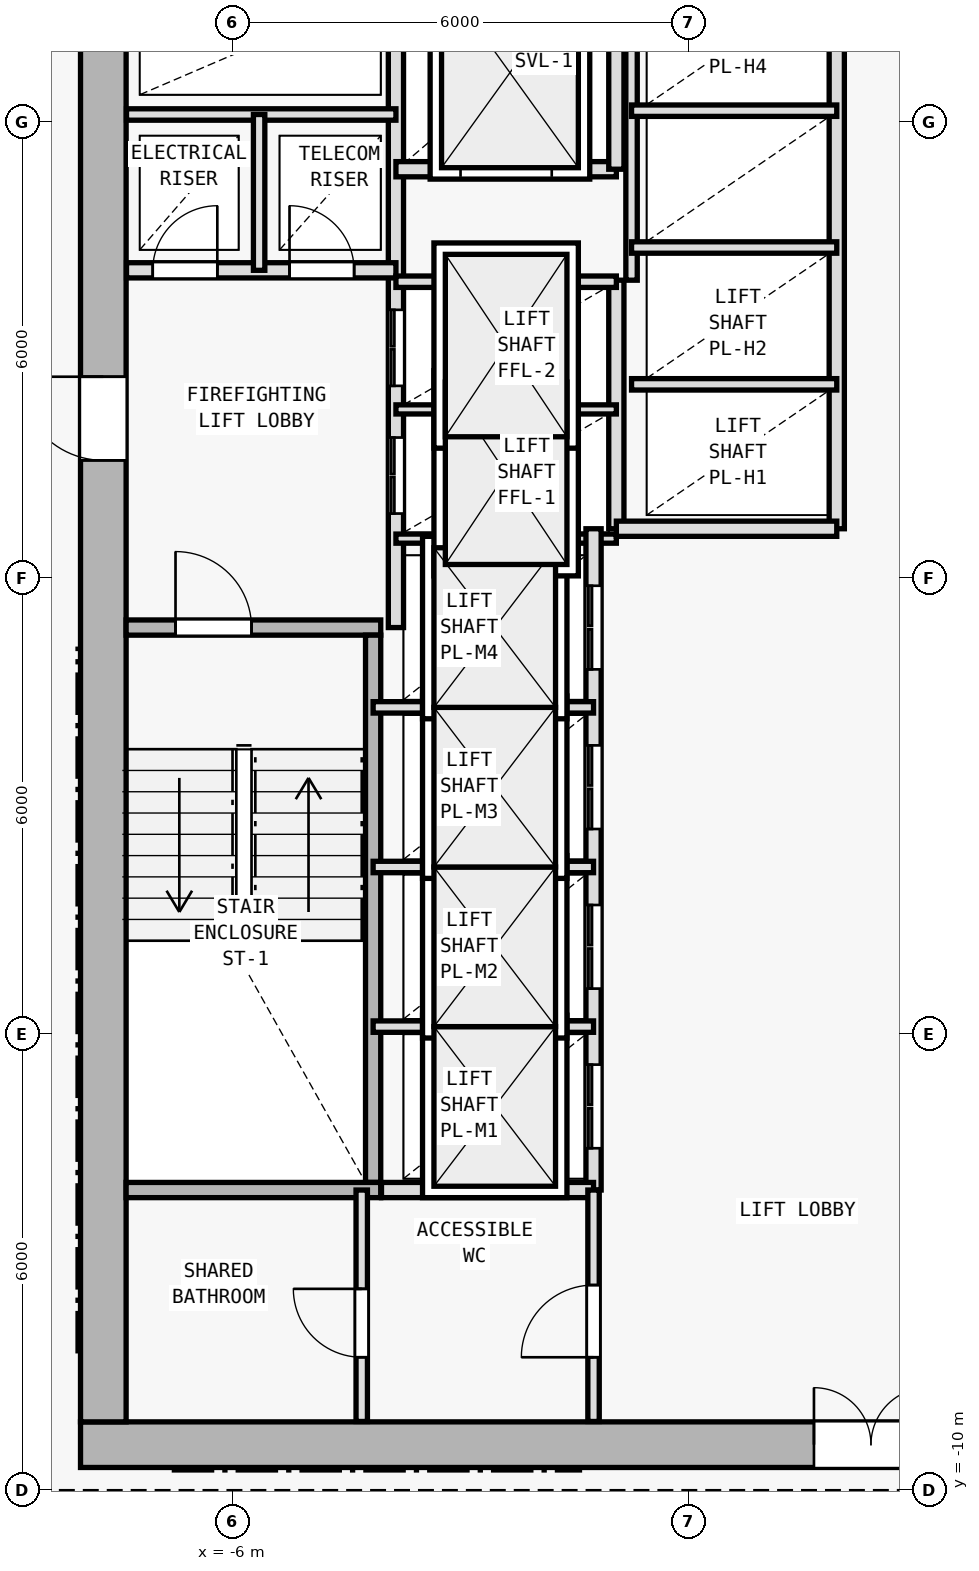
"""IFC4 building model, lengths in metres.
Left out: names, types, materials, properties, quantities, classifications, styles, units other than length and angle.
Written with IfcOpenShell. Run it as: python <this file> out.ifc"""

import sys

from ifc_helpers import new_model, si_unit, direction, frame, frame_2d, origin, origin_2d, place, context, subcontext, project, spatial, rectangle, i_section, extrude, element, fill, save


model = new_model("IFC4")
c1 = context("Model", 3, precision=1e-05, world=origin(), true_north=direction((0.0, 1.0)))
c2 = subcontext(c1, "Body", "Model", "MODEL_VIEW")
j1 = project(units=[si_unit("LENGTHUNIT", "METRE"), si_unit("PLANEANGLEUNIT", "RADIAN")], contexts=[c1])
p1 = place(None, origin())
s1 = spatial("IfcSite", under=j1, at=p1, CompositionType="ELEMENT")
p2 = place(p1, origin())
s2 = spatial("IfcBuilding", under=s1, at=p2, CompositionType="ELEMENT")
p3 = place(p2, frame((0.0, 0.0, 107.7)))
s3 = spatial("IfcBuildingStorey", under=s2, at=p3, CompositionType="ELEMENT", Elevation=107.7)
for number, where, z_axis, x_axis in (
    (1, (-7.7, -9.4, 0.0), (0.0, 0.0, 1.0), (1.0, 0.0, 0.0)),
    (2, (0.0, -9.4, 0.0), (0.0, 0.0, 1.0), (1.0, 0.0, 0.0)),
    (3, (-7.7, 2.0, 0.0), (0.0, 0.0, 1.0), (1.0, 0.0, 0.0)),
):
    element("IfcColumn", number, at=place(p3, frame(where, z_axis=z_axis, x_axis=x_axis)), inside=s3, PredefinedType="COLUMN", context=c2, shape_type="SweptSolid", body=[
        extrude(i_section(OverallWidth=0.409, OverallDepth=0.425, WebThickness=0.021, FlangeThickness=0.034, FilletRadius=0.015, at=origin_2d()), origin(), (0.0, 0.0, 1.0), 3.6),
    ])
p4 = place(p3, frame((-8.0, -9.4, 0.0), z_axis=(0.0, 0.0, 1.0), x_axis=(1.0, 0.0, 0.0)))
e4 = element("IfcWall", 4, at=p4, inside=s3, PredefinedType="SHEAR", context=c2, shape_type="SweptSolid", body=[
    extrude(rectangle(XDim=16.0, YDim=0.6, at=frame_2d((8.0, 0.0))), origin(), (0.0, 0.0, 1.0), 3.35),
])
p5 = place(p4, frame((9.65, 0.0, 0.0)))
e5 = element("IfcOpeningElement", 5, at=p5, cuts=e4, PredefinedType="OPENING", context=c2, shape_type="SweptSolid", body=[
    extrude(rectangle(XDim=1.5, YDim=2.2, at=frame_2d((0.75, 1.1))), frame((0.0, 0.31, 0.0), z_axis=(0.0, -1.0, 0.0), x_axis=(1.0, 0.0, 0.0)), (0.0, 0.0, 1.0), 0.62),
])
p6 = place(p3, frame((-7.7, -9.1, 0.0), z_axis=(0.0, 0.0, 1.0), x_axis=(0.0, 1.0, 0.0)))
e6 = element("IfcWall", 6, at=p6, inside=s3, PredefinedType="SHEAR", context=c2, shape_type="SweptSolid", body=[
    extrude(rectangle(XDim=19.0, YDim=0.6, at=frame_2d((9.5, 0.0))), origin(), (0.0, 0.0, 1.0), 3.35),
])
p7 = place(p6, frame((12.65, 0.0, 0.0)))
e7 = element("IfcOpeningElement", 7, at=p7, cuts=e6, PredefinedType="OPENING", context=c2, shape_type="SweptSolid", body=[
    extrude(rectangle(XDim=1.1, YDim=2.15, at=frame_2d((0.55, 1.075))), frame((0.0, 0.31, 0.0), z_axis=(0.0, -1.0, 0.0), x_axis=(1.0, 0.0, 0.0)), (0.0, 0.0, 1.0), 0.62),
])
p8 = place(p3, frame((-7.4, 1.35, 0.0), z_axis=(0.0, 0.0, 1.0), x_axis=(1.0, 0.0, 0.0)))
e8 = element("IfcWall", 8, at=p8, inside=s3, PredefinedType="SOLIDWALL", context=c2, shape_type="SweptSolid", body=[
    extrude(rectangle(XDim=3.35, YDim=0.2, at=frame_2d((1.675, 0.0))), origin(), (0.0, 0.0, 1.0), 3.35),
])
p9 = place(p8, frame((0.65, 0.0, 0.0)))
e9 = element("IfcOpeningElement", 9, at=p9, cuts=e8, PredefinedType="OPENING", context=c2, shape_type="SweptSolid", body=[
    extrude(rectangle(XDim=1.0, YDim=2.15, at=frame_2d((0.5, 1.075))), frame((0.0, 0.11, 0.0), z_axis=(0.0, -1.0, 0.0), x_axis=(1.0, 0.0, 0.0)), (0.0, 0.0, 1.0), 0.22),
])
p10 = place(p3, frame((-4.15, -5.95, 0.0), z_axis=(0.0, 0.0, 1.0), x_axis=(0.0, 1.0, 0.0)))
e10 = element("IfcWall", 10, at=p10, inside=s3, PredefinedType="SOLIDWALL", context=c2, shape_type="SweptSolid", body=[
    extrude(rectangle(XDim=7.2, YDim=0.2, at=frame_2d((3.6, 0.0))), origin(), (0.0, 0.0, 1.0), 3.35),
])
p11 = place(p3, frame((-3.85, 1.35, 0.0), z_axis=(0.0, 0.0, 1.0), x_axis=(0.0, 1.0, 0.0)))
e11 = element("IfcWall", 11, at=p11, inside=s3, PredefinedType="SOLIDWALL", context=c2, shape_type="SweptSolid", body=[
    extrude(rectangle(XDim=8.545, YDim=0.2, at=frame_2d((4.272, 0.0))), origin(), (0.0, 0.0, 1.0), 3.35),
])
p12 = place(p11, frame((1.5, 0.0, 0.0)))
e12 = element("IfcOpeningElement", 12, at=p12, cuts=e11, PredefinedType="OPENING", context=c2, shape_type="SweptSolid", body=[
    extrude(rectangle(XDim=1.0, YDim=2.15, at=frame_2d((0.5, 1.075))), frame((0.0, 0.11, 0.0), z_axis=(0.0, -1.0, 0.0), x_axis=(1.0, 0.0, 0.0)), (0.0, 0.0, 1.0), 0.22),
])
p13 = place(p11, frame((3.18, 0.0, 0.0)))
e13 = element("IfcOpeningElement", 13, at=p13, cuts=e11, PredefinedType="OPENING", context=c2, shape_type="SweptSolid", body=[
    extrude(rectangle(XDim=1.0, YDim=2.15, at=frame_2d((0.5, 1.075))), frame((0.0, 0.11, 0.0), z_axis=(0.0, -1.0, 0.0), x_axis=(1.0, 0.0, 0.0)), (0.0, 0.0, 1.0), 0.22),
])
p14 = place(p3, frame((-7.395, 6.05, 0.0), z_axis=(0.0, 0.0, 1.0), x_axis=(1.0, 0.0, 0.0)))
e14 = element("IfcWall", 14, at=p14, inside=s3, PredefinedType="SOLIDWALL", context=c2, shape_type="SweptSolid", body=[
    extrude(rectangle(XDim=3.545, YDim=0.2, at=frame_2d((1.772, 0.0))), origin(), (0.0, 0.0, 1.0), 3.35),
])
p15 = place(p14, frame((0.345, 0.0, 0.0)))
e15 = element("IfcOpeningElement", 15, at=p15, cuts=e14, PredefinedType="OPENING", context=c2, shape_type="SweptSolid", body=[
    extrude(rectangle(XDim=0.85, YDim=2.1, at=frame_2d((0.425, 1.05))), frame((0.0, 0.11, 0.0), z_axis=(0.0, -1.0, 0.0), x_axis=(1.0, 0.0, 0.0)), (0.0, 0.0, 1.0), 0.22),
])
p16 = place(p14, frame((2.145, 0.0, 0.0)))
e16 = element("IfcOpeningElement", 16, at=p16, cuts=e14, PredefinedType="OPENING", context=c2, shape_type="SweptSolid", body=[
    extrude(rectangle(XDim=0.85, YDim=2.1, at=frame_2d((0.425, 1.05))), frame((0.0, 0.11, 0.0), z_axis=(0.0, -1.0, 0.0), x_axis=(1.0, 0.0, 0.0)), (0.0, 0.0, 1.0), 0.22),
])
p17 = place(p3, frame((-7.395, 8.1, 0.0), z_axis=(0.0, 0.0, 1.0), x_axis=(1.0, 0.0, 0.0)))
e17 = element("IfcWall", 17, at=p17, inside=s3, PredefinedType="PARTITIONING", context=c2, shape_type="SweptSolid", body=[
    extrude(rectangle(XDim=3.545, YDim=0.15, at=frame_2d((1.772, 0.0))), origin(), (0.0, 0.0, 1.0), 3.35),
])
p18 = place(p3, frame((-5.65, 6.05, 0.0), z_axis=(0.0, 0.0, 1.0), x_axis=(0.0, 1.0, 0.0)))
e18 = element("IfcWall", 18, at=p18, inside=s3, PredefinedType="PARTITIONING", context=c2, shape_type="SweptSolid", body=[
    extrude(rectangle(XDim=2.05, YDim=0.15, at=frame_2d((1.025, 0.0))), origin(), (0.0, 0.0, 1.0), 3.35),
])
p19 = place(p3, frame((-0.95, 2.65, 0.0), z_axis=(0.0, 0.0, 1.0), x_axis=(0.0, 1.0, 0.0)))
e19 = element("IfcWall", 19, at=p19, inside=s3, PredefinedType="SOLIDWALL", context=c2, shape_type="SweptSolid", body=[
    extrude(rectangle(XDim=3.27, YDim=0.2, at=frame_2d((1.635, 0.0))), origin(), (0.0, 0.0, 1.0), 3.35),
])
for number, where, z_axis, x_axis in (
    (20, (-3.85, 2.52, 0.0), (0.0, 0.0, 1.0), (1.0, 0.0, 0.0)),
    (21, (-3.85, 4.22, 0.0), (0.0, 0.0, 1.0), (1.0, 0.0, 0.0)),
):
    element("IfcWall", number, at=place(p3, frame(where, z_axis=z_axis, x_axis=x_axis)), inside=s3, PredefinedType="PARTITIONING", context=c2, shape_type="SweptSolid", body=[
        extrude(rectangle(XDim=2.9, YDim=0.12, at=frame_2d((1.45, 0.0))), origin(), (0.0, 0.0, 1.0), 3.35),
    ])
p20 = place(p3, frame((-3.85, 5.9, 0.0), z_axis=(0.0, 0.0, 1.0), x_axis=(1.0, 0.0, 0.0)))
e22 = element("IfcWall", 22, at=p20, inside=s3, PredefinedType="PARTITIONING", context=c2, shape_type="SweptSolid", body=[
    extrude(rectangle(XDim=2.9, YDim=0.15, at=frame_2d((1.45, 0.0))), origin(), (0.0, 0.0, 1.0), 3.35),
])
p21 = place(p3, frame((-3.85, 7.38, 0.0), z_axis=(0.0, 0.0, 1.0), x_axis=(1.0, 0.0, 0.0)))
e23 = element("IfcWall", 23, at=p21, inside=s3, PredefinedType="SOLIDWALL", context=c2, shape_type="SweptSolid", body=[
    extrude(rectangle(XDim=2.9, YDim=0.2, at=frame_2d((1.45, 0.0))), origin(), (0.0, 0.0, 1.0), 3.35),
])
p22 = place(p21, frame((0.85, 0.0, 0.0)))
e24 = element("IfcOpeningElement", 24, at=p22, cuts=e23, PredefinedType="OPENING", context=c2, shape_type="SweptSolid", body=[
    extrude(rectangle(XDim=1.2, YDim=2.2, at=frame_2d((0.6, 1.1))), frame((0.0, 0.11, 0.0), z_axis=(0.0, -1.0, 0.0), x_axis=(1.0, 0.0, 0.0)), (0.0, 0.0, 1.0), 0.22),
])
p23 = place(p3, frame((-0.95, 7.38, 0.0), z_axis=(0.0, 0.0, 1.0), x_axis=(0.0, 1.0, 0.0)))
e25 = element("IfcWall", 25, at=p23, inside=s3, PredefinedType="SOLIDWALL", context=c2, shape_type="SweptSolid", body=[
    extrude(rectangle(XDim=2.515, YDim=0.2, at=frame_2d((1.258, 0.0))), origin(), (0.0, 0.0, 1.0), 3.35),
])
p24 = place(p3, frame((-1.25, -6.05, 0.0), z_axis=(0.0, 0.0, 1.0), x_axis=(0.0, 1.0, 0.0)))
e26 = element("IfcWall", 26, at=p24, inside=s3, PredefinedType="SOLIDWALL", context=c2, shape_type="SweptSolid", body=[
    extrude(rectangle(XDim=8.7, YDim=0.2, at=frame_2d((4.35, 0.0))), origin(), (0.0, 0.0, 1.0), 3.35),
])
p25 = place(p24, frame((0.55, 0.0, 0.0)))
e27 = element("IfcOpeningElement", 27, at=p25, cuts=e26, PredefinedType="OPENING", context=c2, shape_type="SweptSolid", body=[
    extrude(rectangle(XDim=1.1, YDim=2.15, at=frame_2d((0.55, 1.075))), frame((0.0, 0.11, 0.0), z_axis=(0.0, -1.0, 0.0), x_axis=(1.0, 0.0, 0.0)), (0.0, 0.0, 1.0), 0.22),
])
p26 = place(p24, frame((2.65, 0.0, 0.0)))
e28 = element("IfcOpeningElement", 28, at=p26, cuts=e26, PredefinedType="OPENING", context=c2, shape_type="SweptSolid", body=[
    extrude(rectangle(XDim=1.1, YDim=2.15, at=frame_2d((0.55, 1.075))), frame((0.0, 0.11, 0.0), z_axis=(0.0, -1.0, 0.0), x_axis=(1.0, 0.0, 0.0)), (0.0, 0.0, 1.0), 0.22),
])
p27 = place(p24, frame((4.75, 0.0, 0.0)))
e29 = element("IfcOpeningElement", 29, at=p27, cuts=e26, PredefinedType="OPENING", context=c2, shape_type="SweptSolid", body=[
    extrude(rectangle(XDim=1.1, YDim=2.15, at=frame_2d((0.55, 1.075))), frame((0.0, 0.11, 0.0), z_axis=(0.0, -1.0, 0.0), x_axis=(1.0, 0.0, 0.0)), (0.0, 0.0, 1.0), 0.22),
])
p28 = place(p24, frame((6.85, 0.0, 0.0)))
e30 = element("IfcOpeningElement", 30, at=p28, cuts=e26, PredefinedType="OPENING", context=c2, shape_type="SweptSolid", body=[
    extrude(rectangle(XDim=1.1, YDim=2.15, at=frame_2d((0.55, 1.075))), frame((0.0, 0.11, 0.0), z_axis=(0.0, -1.0, 0.0), x_axis=(1.0, 0.0, 0.0)), (0.0, 0.0, 1.0), 0.22),
])
for number, where, z_axis, x_axis in (
    (31, (-4.15, -3.9, 0.0), (0.0, 0.0, 1.0), (1.0, 0.0, 0.0)),
    (32, (-4.15, -1.8, 0.0), (0.0, 0.0, 1.0), (1.0, 0.0, 0.0)),
    (33, (-4.15, 0.3, 0.0), (0.0, 0.0, 1.0), (1.0, 0.0, 0.0)),
):
    element("IfcWall", number, at=place(p3, frame(where, z_axis=z_axis, x_axis=x_axis)), inside=s3, PredefinedType="PARTITIONING", context=c2, shape_type="SweptSolid", body=[
        extrude(rectangle(XDim=2.9, YDim=0.15, at=frame_2d((1.45, 0.0))), origin(), (0.0, 0.0, 1.0), 3.35),
    ])
p29 = place(p3, frame((1.95, 2.65, 0.0), z_axis=(0.0, 0.0, 1.0), x_axis=(0.0, 1.0, 0.0)))
e34 = element("IfcWall", 34, at=p29, inside=s3, PredefinedType="SOLIDWALL", context=c2, shape_type="SweptSolid", body=[
    extrude(rectangle(XDim=7.245, YDim=0.2, at=frame_2d((3.623, 0.0))), origin(), (0.0, 0.0, 1.0), 3.35),
])
p30 = place(p3, frame((-0.95, 2.65, 0.0), z_axis=(0.0, 0.0, 1.0), x_axis=(1.0, 0.0, 0.0)))
e35 = element("IfcWall", 35, at=p30, inside=s3, PredefinedType="SOLIDWALL", context=c2, shape_type="SweptSolid", body=[
    extrude(rectangle(XDim=2.9, YDim=0.2, at=frame_2d((1.45, 0.0))), origin(), (0.0, 0.0, 1.0), 3.35),
])
p31 = place(p3, frame((-0.75, 5.92, 0.0), z_axis=(0.0, 0.0, 1.0), x_axis=(0.0, 1.0, 0.0)))
e36 = element("IfcWall", 36, at=p31, inside=s3, PredefinedType="PARTITIONING", context=c2, shape_type="SweptSolid", body=[
    extrude(rectangle(XDim=3.975, YDim=0.15, at=frame_2d((1.988, 0.0))), origin(), (0.0, 0.0, 1.0), 3.35),
])
for number, where, z_axis, x_axis in (
    (37, (-0.75, 4.55, 0.0), (0.0, 0.0, 1.0), (1.0, 0.0, 0.0)),
    (38, (-0.75, 6.35, 0.0), (0.0, 0.0, 1.0), (1.0, 0.0, 0.0)),
    (39, (-0.75, 8.15, 0.0), (0.0, 0.0, 1.0), (1.0, 0.0, 0.0)),
):
    element("IfcWall", number, at=place(p3, frame(where, z_axis=z_axis, x_axis=x_axis)), inside=s3, PredefinedType="PARTITIONING", context=c2, shape_type="SweptSolid", body=[
        extrude(rectangle(XDim=2.7, YDim=0.15, at=frame_2d((1.35, 0.0))), origin(), (0.0, 0.0, 1.0), 3.35),
    ])
p32 = place(p3, frame((-7.4, -6.05, 0.0), z_axis=(0.0, 0.0, 1.0), x_axis=(1.0, 0.0, 0.0)))
e40 = element("IfcWall", 40, at=p32, inside=s3, PredefinedType="SOLIDWALL", context=c2, shape_type="SweptSolid", body=[
    extrude(rectangle(XDim=3.35, YDim=0.2, at=frame_2d((1.675, 0.0))), origin(), (0.0, 0.0, 1.0), 3.35),
])
p33 = place(p3, frame((-4.04, -6.05, 0.0), z_axis=(0.0, 0.0, 1.0), x_axis=(1.0, 0.0, 0.0)))
e41 = element("IfcWall", 41, at=p33, inside=s3, PredefinedType="SOLIDWALL", context=c2, shape_type="SweptSolid", body=[
    extrude(rectangle(XDim=2.79, YDim=0.2, at=frame_2d((1.395, 0.0))), origin(), (0.0, 0.0, 1.0), 3.35),
])
p34 = place(p3, frame((-1.25, -9.095, 0.0), z_axis=(0.0, 0.0, 1.0), x_axis=(0.0, 1.0, 0.0)))
e42 = element("IfcWall", 42, at=p34, inside=s3, PredefinedType="PARTITIONING", context=c2, shape_type="SweptSolid", body=[
    extrude(rectangle(XDim=3.045, YDim=0.15, at=frame_2d((1.522, 0.0))), origin(), (0.0, 0.0, 1.0), 3.35),
])
p35 = place(p34, frame((0.845, 0.0, 0.0)))
e43 = element("IfcOpeningElement", 43, at=p35, cuts=e42, PredefinedType="OPENING", context=c2, shape_type="SweptSolid", body=[
    extrude(rectangle(XDim=0.95, YDim=2.1, at=frame_2d((0.475, 1.05))), frame((0.0, 0.085, 0.0), z_axis=(0.0, -1.0, 0.0), x_axis=(1.0, 0.0, 0.0)), (0.0, 0.0, 1.0), 0.17),
])
p36 = place(p3, frame((-4.3, -9.095, 0.0), z_axis=(0.0, 0.0, 1.0), x_axis=(0.0, 1.0, 0.0)))
e44 = element("IfcWall", 44, at=p36, inside=s3, PredefinedType="PARTITIONING", context=c2, shape_type="SweptSolid", body=[
    extrude(rectangle(XDim=3.045, YDim=0.15, at=frame_2d((1.522, 0.0))), origin(), (0.0, 0.0, 1.0), 3.35),
])
p37 = place(p36, frame((0.845, 0.0, 0.0)))
e45 = element("IfcOpeningElement", 45, at=p37, cuts=e44, PredefinedType="OPENING", context=c2, shape_type="SweptSolid", body=[
    extrude(rectangle(XDim=0.9, YDim=2.1, at=frame_2d((0.45, 1.05))), frame((0.0, 0.085, 0.0), z_axis=(0.0, -1.0, 0.0), x_axis=(1.0, 0.0, 0.0)), (0.0, 0.0, 1.0), 0.17),
])
p38 = place(p3, frame((-9.86, 8.426, 0.0), z_axis=(0.0, 0.0, 1.0), x_axis=(0.582449511476, 0.812866881218, 0.0)))
e46 = element("IfcWall", 46, at=p38, inside=s3, PredefinedType="PARTITIONING", context=c2, shape_type="SweptSolid", body=[
    extrude(rectangle(XDim=4.84, YDim=0.15, at=frame_2d((2.42, 0.0))), origin(), (0.0, 0.0, 1.0), 2.775),
])
p39 = place(p5, origin())
e47 = element("IfcDoor", 47, at=p39, inside=s3, OperationType="DOUBLE_DOOR_SINGLE_SWING", PredefinedType="DOOR", context=c2, shape_type="SweptSolid", body=[
    extrude(rectangle(XDim=1.5, YDim=2.2, at=frame_2d((0.75, 1.1))), frame((0.0, 0.025, 0.0), z_axis=(0.0, -1.0, 0.0), x_axis=(1.0, 0.0, 0.0)), (0.0, 0.0, 1.0), 0.05),
])
fill(e5, e47)
p40 = place(p7, origin())
e48 = element("IfcDoor", 48, at=p40, inside=s3, OperationType="SINGLE_SWING_RIGHT", PredefinedType="DOOR", context=c2, shape_type="SweptSolid", body=[
    extrude(rectangle(XDim=1.1, YDim=2.15, at=frame_2d((0.55, 1.075))), frame((0.0, 0.025, 0.0), z_axis=(0.0, -1.0, 0.0), x_axis=(1.0, 0.0, 0.0)), (0.0, 0.0, 1.0), 0.05),
])
fill(e7, e48)
p41 = place(p9, origin())
e49 = element("IfcDoor", 49, at=p41, inside=s3, OperationType="SINGLE_SWING_LEFT", PredefinedType="DOOR", context=c2, shape_type="SweptSolid", body=[
    extrude(rectangle(XDim=1.0, YDim=2.15, at=frame_2d((0.5, 1.075))), frame((0.0, 0.025, 0.0), z_axis=(0.0, -1.0, 0.0), x_axis=(1.0, 0.0, 0.0)), (0.0, 0.0, 1.0), 0.05),
])
fill(e9, e49)
p42 = place(p15, origin())
e50 = element("IfcDoor", 50, at=p42, inside=s3, OperationType="SINGLE_SWING_RIGHT", PredefinedType="DOOR", context=c2, shape_type="SweptSolid", body=[
    extrude(rectangle(XDim=0.85, YDim=2.1, at=frame_2d((0.425, 1.05))), frame((0.0, 0.025, 0.0), z_axis=(0.0, -1.0, 0.0), x_axis=(1.0, 0.0, 0.0)), (0.0, 0.0, 1.0), 0.05),
])
fill(e15, e50)
p43 = place(p16, origin())
e51 = element("IfcDoor", 51, at=p43, inside=s3, OperationType="SINGLE_SWING_LEFT", PredefinedType="DOOR", context=c2, shape_type="SweptSolid", body=[
    extrude(rectangle(XDim=0.85, YDim=2.1, at=frame_2d((0.425, 1.05))), frame((0.0, 0.025, 0.0), z_axis=(0.0, -1.0, 0.0), x_axis=(1.0, 0.0, 0.0)), (0.0, 0.0, 1.0), 0.05),
])
fill(e16, e51)
p44 = place(p22, origin())
e52 = element("IfcDoor", 52, at=p44, inside=s3, OperationType="DOUBLE_DOOR_SLIDING", PredefinedType="DOOR", context=c2, shape_type="SweptSolid", body=[
    extrude(rectangle(XDim=1.2, YDim=2.2, at=frame_2d((0.6, 1.1))), frame((0.0, 0.025, 0.0), z_axis=(0.0, -1.0, 0.0), x_axis=(1.0, 0.0, 0.0)), (0.0, 0.0, 1.0), 0.05),
])
fill(e24, e52)
p45 = place(p25, origin())
e53 = element("IfcDoor", 53, at=p45, inside=s3, OperationType="DOUBLE_DOOR_SLIDING", PredefinedType="DOOR", context=c2, shape_type="SweptSolid", body=[
    extrude(rectangle(XDim=1.1, YDim=2.15, at=frame_2d((0.55, 1.075))), frame((0.0, 0.025, 0.0), z_axis=(0.0, -1.0, 0.0), x_axis=(1.0, 0.0, 0.0)), (0.0, 0.0, 1.0), 0.05),
])
fill(e27, e53)
p46 = place(p26, origin())
e54 = element("IfcDoor", 54, at=p46, inside=s3, OperationType="DOUBLE_DOOR_SLIDING", PredefinedType="DOOR", context=c2, shape_type="SweptSolid", body=[
    extrude(rectangle(XDim=1.1, YDim=2.15, at=frame_2d((0.55, 1.075))), frame((0.0, 0.025, 0.0), z_axis=(0.0, -1.0, 0.0), x_axis=(1.0, 0.0, 0.0)), (0.0, 0.0, 1.0), 0.05),
])
fill(e28, e54)
p47 = place(p27, origin())
e55 = element("IfcDoor", 55, at=p47, inside=s3, OperationType="DOUBLE_DOOR_SLIDING", PredefinedType="DOOR", context=c2, shape_type="SweptSolid", body=[
    extrude(rectangle(XDim=1.1, YDim=2.15, at=frame_2d((0.55, 1.075))), frame((0.0, 0.025, 0.0), z_axis=(0.0, -1.0, 0.0), x_axis=(1.0, 0.0, 0.0)), (0.0, 0.0, 1.0), 0.05),
])
fill(e29, e55)
p48 = place(p28, origin())
e56 = element("IfcDoor", 56, at=p48, inside=s3, OperationType="DOUBLE_DOOR_SLIDING", PredefinedType="DOOR", context=c2, shape_type="SweptSolid", body=[
    extrude(rectangle(XDim=1.1, YDim=2.15, at=frame_2d((0.55, 1.075))), frame((0.0, 0.025, 0.0), z_axis=(0.0, -1.0, 0.0), x_axis=(1.0, 0.0, 0.0)), (0.0, 0.0, 1.0), 0.05),
])
fill(e30, e56)
p49 = place(p12, origin())
e57 = element("IfcDoor", 57, at=p49, inside=s3, OperationType="DOUBLE_DOOR_SLIDING", PredefinedType="DOOR", context=c2, shape_type="SweptSolid", body=[
    extrude(rectangle(XDim=1.0, YDim=2.15, at=frame_2d((0.5, 1.075))), frame((0.0, 0.025, 0.0), z_axis=(0.0, -1.0, 0.0), x_axis=(1.0, 0.0, 0.0)), (0.0, 0.0, 1.0), 0.05),
])
fill(e12, e57)
p50 = place(p13, origin())
e58 = element("IfcDoor", 58, at=p50, inside=s3, OperationType="DOUBLE_DOOR_SLIDING", PredefinedType="DOOR", context=c2, shape_type="SweptSolid", body=[
    extrude(rectangle(XDim=1.0, YDim=2.15, at=frame_2d((0.5, 1.075))), frame((0.0, 0.025, 0.0), z_axis=(0.0, -1.0, 0.0), x_axis=(1.0, 0.0, 0.0)), (0.0, 0.0, 1.0), 0.05),
])
fill(e13, e58)
p51 = place(p35, origin())
e59 = element("IfcDoor", 59, at=p51, inside=s3, OperationType="SINGLE_SWING_LEFT", PredefinedType="DOOR", context=c2, shape_type="SweptSolid", body=[
    extrude(rectangle(XDim=0.95, YDim=2.1, at=frame_2d((0.475, 1.05))), frame((0.0, 0.025, 0.0), z_axis=(0.0, -1.0, 0.0), x_axis=(1.0, 0.0, 0.0)), (0.0, 0.0, 1.0), 0.05),
])
fill(e43, e59)
p52 = place(p37, origin())
e60 = element("IfcDoor", 60, at=p52, inside=s3, OperationType="SINGLE_SWING_RIGHT", PredefinedType="DOOR", context=c2, shape_type="SweptSolid", body=[
    extrude(rectangle(XDim=0.9, YDim=2.1, at=frame_2d((0.45, 1.05))), frame((0.0, 0.025, 0.0), z_axis=(0.0, -1.0, 0.0), x_axis=(1.0, 0.0, 0.0)), (0.0, 0.0, 1.0), 0.05),
])
fill(e45, e60)
save(model, sys.argv[1])
